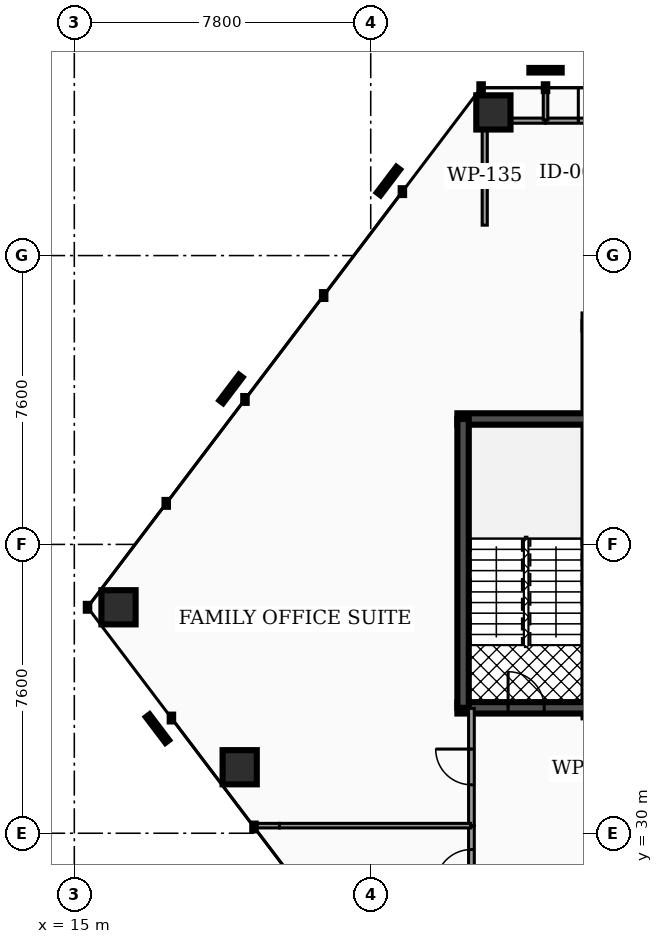
"""IFC4 building model, lengths in metres.
Left out: names, types, materials, properties, quantities, classifications, styles, units other than length and angle.
Written with IfcOpenShell. Run it as: python <this file> out.ifc"""

import sys

from ifc_helpers import new_model, si_unit, direction, frame, frame_2d, origin, origin_2d, place, context, subcontext, project, spatial, rectangle, hollow_rectangle, extrude, element, fill, save


model = new_model("IFC4")
c1 = context("Model", 3, precision=1e-05, world=origin(), true_north=direction((0.0, 1.0)))
c2 = subcontext(c1, "Body", "Model", "MODEL_VIEW")
j1 = project(units=[si_unit("LENGTHUNIT", "METRE"), si_unit("PLANEANGLEUNIT", "RADIAN")], contexts=[c1])
p1 = place(None, origin())
s1 = spatial("IfcSite", under=j1, at=p1, CompositionType="ELEMENT")
p2 = place(p1, origin())
s2 = spatial("IfcBuilding", under=s1, at=p2, CompositionType="ELEMENT")
p3 = place(p2, frame((0.0, 0.0, 92.82)))
s3 = spatial("IfcBuildingStorey", under=s2, at=p3, CompositionType="ELEMENT", Elevation=92.82)
p4 = place(p3, frame((25.08, 40.9, 0.0), z_axis=(0.0, 0.0, 1.0), x_axis=(1.0, 0.0, 0.0)))
e1 = element("IfcWall", 1, at=p4, inside=s3, PredefinedType="SHEAR", context=c2, shape_type="SweptSolid", body=[
    extrude(rectangle(XDim=3.52, YDim=0.3, at=frame_2d((1.76, 0.0))), origin(), (0.0, 0.0, 1.0), 3.82),
])
p5 = place(p3, frame((25.08, 33.3, 0.0), z_axis=(0.0, 0.0, 1.0), x_axis=(1.0, 0.0, 0.0)))
e2 = element("IfcWall", 2, at=p5, inside=s3, PredefinedType="SHEAR", context=c2, shape_type="SweptSolid", body=[
    extrude(rectangle(XDim=3.52, YDim=0.3, at=frame_2d((1.76, 0.0))), origin(), (0.0, 0.0, 1.0), 3.82),
])
p6 = place(p5, frame((1.335, 0.0, 0.0)))
e3 = element("IfcOpeningElement", 3, at=p6, cuts=e2, PredefinedType="OPENING", context=c2, shape_type="SweptSolid", body=[
    extrude(rectangle(XDim=0.95, YDim=2.2, at=frame_2d((0.475, 1.1))), frame((0.0, 0.16, 0.0), z_axis=(0.0, -1.0, 0.0), x_axis=(1.0, 0.0, 0.0)), (0.0, 0.0, 1.0), 0.32),
])
p7 = place(p3, frame((25.23, 33.3, 0.0), z_axis=(0.0, 0.0, 1.0), x_axis=(0.0, 1.0, 0.0)))
e4 = element("IfcWall", 4, at=p7, inside=s3, PredefinedType="SHEAR", context=c2, shape_type="SweptSolid", body=[
    extrude(rectangle(XDim=7.6, YDim=0.3, at=frame_2d((3.8, 0.0))), origin(), (0.0, 0.0, 1.0), 3.82),
])
p8 = place(p3, frame((26.028, 48.967, 0.0), z_axis=(-0.140169960951, -0.030235217209, 0.989665708049), x_axis=(0.210854401994, -0.977517478698, 0.0)))
e5 = element("IfcColumn", 5, at=p8, inside=s3, PredefinedType="COLUMN", context=c2, shape_type="SweptSolid", body=[
    extrude(hollow_rectangle(XDim=0.9, YDim=0.9, WallThickness=0.045, at=origin_2d()), origin(), (0.0, 0.0, 1.0), 3.86),
])
p9 = place(p3, frame((16.163, 35.946, 0.0), z_axis=(-0.028868984836, 0.116998698982, 0.992712388434), x_axis=(-0.970881249867, -0.239561262847, 0.0)))
e6 = element("IfcColumn", 6, at=p9, inside=s3, PredefinedType="COLUMN", context=c2, shape_type="SweptSolid", body=[
    extrude(hollow_rectangle(XDim=0.9, YDim=0.9, WallThickness=0.045, at=origin_2d()), origin(), (0.0, 0.0, 1.0), 3.848),
])
p10 = place(p3, frame((19.352, 31.737, 0.0), z_axis=(-0.00012742477, 0.079385631445, 0.996843972386), x_axis=(-0.999998711771, -0.001605134369, 0.0)))
e7 = element("IfcColumn", 7, at=p10, inside=s3, PredefinedType="COLUMN", context=c2, shape_type="SweptSolid", body=[
    extrude(hollow_rectangle(XDim=0.9, YDim=0.9, WallThickness=0.045, at=origin_2d()), origin(), (0.0, 0.0, 1.0), 3.832),
])
p11 = place(p3, frame((25.45, 28.02, 0.0), z_axis=(0.0, 0.0, 1.0), x_axis=(0.0, 1.0, 0.0)))
e8 = element("IfcWall", 8, at=p11, inside=s3, PredefinedType="PARTITIONING", context=c2, shape_type="SweptSolid", body=[
    extrude(rectangle(XDim=2.165, YDim=0.15, at=frame_2d((1.083, 0.0))), origin(), (0.0, 0.0, 1.0), 2.777),
])
p12 = place(p11, frame((0.613, 0.0, 0.0)))
e9 = element("IfcOpeningElement", 9, at=p12, cuts=e8, PredefinedType="OPENING", context=c2, shape_type="SweptSolid", body=[
    extrude(rectangle(XDim=0.94, YDim=2.05, at=frame_2d((0.47, 1.025))), frame((0.0, 0.085, 0.0), z_axis=(0.0, -1.0, 0.0), x_axis=(1.0, 0.0, 0.0)), (0.0, 0.0, 1.0), 0.17),
])
p13 = place(p3, frame((25.45, 30.205, 0.0), z_axis=(0.0, 0.0, 1.0), x_axis=(0.0, 1.0, 0.0)))
e10 = element("IfcWall", 10, at=p13, inside=s3, PredefinedType="PARTITIONING", context=c2, shape_type="SweptSolid", body=[
    extrude(rectangle(XDim=3.08, YDim=0.15, at=frame_2d((1.54, 0.0))), origin(), (0.0, 0.0, 1.0), 2.777),
])
p14 = place(p13, frame((1.07, 0.0, 0.0)))
e11 = element("IfcOpeningElement", 11, at=p14, cuts=e10, PredefinedType="OPENING", context=c2, shape_type="SweptSolid", body=[
    extrude(rectangle(XDim=0.94, YDim=2.05, at=frame_2d((0.47, 1.025))), frame((0.0, 0.085, 0.0), z_axis=(0.0, -1.0, 0.0), x_axis=(1.0, 0.0, 0.0)), (0.0, 0.0, 1.0), 0.17),
])
p15 = place(p3, frame((27.405, 48.75, 0.0), z_axis=(0.0, 0.0, 1.0), x_axis=(1.0, 0.0, 0.0)))
e12 = element("IfcWall", 12, at=p15, inside=s3, PredefinedType="PARTITIONING", context=c2, shape_type="SweptSolid", body=[
    extrude(rectangle(XDim=2.575, YDim=0.135, at=frame_2d((1.288, 0.0))), origin(), (0.0, 0.0, 1.0), 2.777),
])
p16 = place(p15, frame((0.857, 0.0, 0.0)))
e13 = element("IfcOpeningElement", 13, at=p16, cuts=e12, PredefinedType="OPENING", context=c2, shape_type="SweptSolid", body=[
    extrude(rectangle(XDim=0.86, YDim=2.05, at=frame_2d((0.43, 1.025))), frame((0.0, 0.077, 0.0), z_axis=(0.0, -1.0, 0.0), x_axis=(1.0, 0.0, 0.0)), (0.0, 0.0, 1.0), 0.155),
])
p17 = place(p3, frame((25.8, 46.0, 0.0), z_axis=(0.0, 0.0, 1.0), x_axis=(0.0, 1.0, 0.0)))
e14 = element("IfcWall", 14, at=p17, inside=s3, PredefinedType="PARTITIONING", context=c2, shape_type="SweptSolid", body=[
    extrude(rectangle(XDim=2.584, YDim=0.135, at=frame_2d((1.292, 0.0))), origin(), (0.0, 0.0, 1.0), 2.777),
])
p18 = place(p3, frame((25.966, 48.75, 0.0), z_axis=(0.0, 0.0, 1.0), x_axis=(1.0, 0.0, 0.0)))
e15 = element("IfcWall", 15, at=p18, inside=s3, PredefinedType="PARTITIONING", context=c2, shape_type="SweptSolid", body=[
    extrude(rectangle(XDim=1.429, YDim=0.135, at=frame_2d((0.715, 0.0))), origin(), (0.0, 0.0, 1.0), 2.777),
])
p19 = place(p3, frame((27.4, 48.77, 0.0), z_axis=(0.0, 0.0, 1.0), x_axis=(0.0, 1.0, 0.0)))
e16 = element("IfcWall", 16, at=p19, inside=s3, PredefinedType="PARTITIONING", context=c2, shape_type="SweptSolid", body=[
    extrude(rectangle(XDim=0.832, YDim=0.12, at=frame_2d((0.416, 0.0))), origin(), (0.0, 0.0, 1.0), 2.777),
])
p20 = place(p3, frame((19.716, 30.2, 0.0), z_axis=(0.0, 0.0, 1.0), x_axis=(1.0, 0.0, 0.0)))
e17 = element("IfcWall", 17, at=p20, inside=s3, PredefinedType="PARTITIONING", context=c2, shape_type="SweptSolid", body=[
    extrude(rectangle(XDim=0.684, YDim=0.12, at=frame_2d((0.342, 0.0))), origin(), (0.0, 0.0, 1.0), 2.777),
])
p21 = place(p3, frame((20.4, 30.2, 0.0), z_axis=(0.0, 0.0, 1.0), x_axis=(1.0, 0.0, 0.0)))
e18 = element("IfcWall", 18, at=p21, inside=s3, PredefinedType="PARTITIONING", context=c2, shape_type="SweptSolid", body=[
    extrude(rectangle(XDim=5.03, YDim=0.12, at=frame_2d((2.515, 0.0))), origin(), (0.0, 0.0, 1.0), 2.777),
])
p22 = place(p6, origin())
e19 = element("IfcDoor", 19, at=p22, inside=s3, OperationType="SINGLE_SWING_LEFT", PredefinedType="DOOR", context=c2, shape_type="SweptSolid", body=[
    extrude(rectangle(XDim=0.95, YDim=2.2, at=frame_2d((0.475, 1.1))), frame((0.0, 0.025, 0.0), z_axis=(0.0, -1.0, 0.0), x_axis=(1.0, 0.0, 0.0)), (0.0, 0.0, 1.0), 0.05),
])
fill(e3, e19)
p23 = place(p12, origin())
e20 = element("IfcDoor", 20, at=p23, inside=s3, OperationType="SINGLE_SWING_LEFT", PredefinedType="DOOR", context=c2, shape_type="SweptSolid", body=[
    extrude(rectangle(XDim=0.94, YDim=2.05, at=frame_2d((0.47, 1.025))), frame((0.0, 0.025, 0.0), z_axis=(0.0, -1.0, 0.0), x_axis=(1.0, 0.0, 0.0)), (0.0, 0.0, 1.0), 0.05),
])
fill(e9, e20)
p24 = place(p14, origin())
e21 = element("IfcDoor", 21, at=p24, inside=s3, OperationType="SINGLE_SWING_RIGHT", PredefinedType="DOOR", context=c2, shape_type="SweptSolid", body=[
    extrude(rectangle(XDim=0.94, YDim=2.05, at=frame_2d((0.47, 1.025))), frame((0.0, 0.025, 0.0), z_axis=(0.0, -1.0, 0.0), x_axis=(1.0, 0.0, 0.0)), (0.0, 0.0, 1.0), 0.05),
])
fill(e11, e21)
p25 = place(p16, origin())
e22 = element("IfcDoor", 22, at=p25, inside=s3, OperationType="SINGLE_SWING_LEFT", PredefinedType="DOOR", context=c2, shape_type="SweptSolid", body=[
    extrude(rectangle(XDim=0.86, YDim=2.05, at=frame_2d((0.43, 1.025))), frame((0.0, 0.025, 0.0), z_axis=(0.0, -1.0, 0.0), x_axis=(1.0, 0.0, 0.0)), (0.0, 0.0, 1.0), 0.05),
])
fill(e13, e22)
save(model, sys.argv[1])
